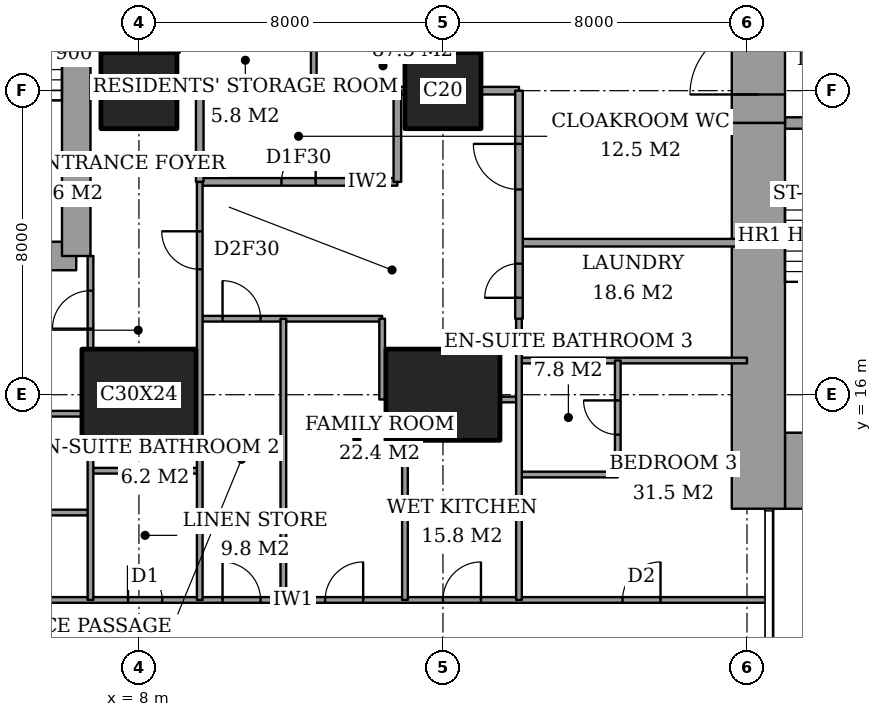
"""IFC4 building model, lengths in metres.
Left out: names, types, materials, properties, quantities, classifications, styles, units other than length and angle.
Written with IfcOpenShell. Run it as: python <this file> out.ifc"""

import sys

from ifc_helpers import new_model, si_unit, direction, frame, frame_2d, origin, origin_2d, place, context, subcontext, project, spatial, rectangle, extrude, element, fill, save


model = new_model("IFC4")
c1 = context("Model", 3, precision=1e-05, world=origin(), true_north=direction((0.0, 1.0)))
c2 = subcontext(c1, "Body", "Model", "MODEL_VIEW")
j1 = project(units=[si_unit("LENGTHUNIT", "METRE"), si_unit("PLANEANGLEUNIT", "RADIAN")], contexts=[c1])
p1 = place(None, origin())
s1 = spatial("IfcSite", under=j1, at=p1, CompositionType="ELEMENT")
p2 = place(p1, origin())
s2 = spatial("IfcBuilding", under=s1, at=p2, CompositionType="ELEMENT")
p3 = place(p2, frame((0.0, 0.0, 65.6)))
s3 = spatial("IfcBuildingStorey", under=s2, at=p3, CompositionType="ELEMENT", Elevation=65.6)
p4 = place(p3, frame((8.0, 16.0, 0.0), z_axis=(0.0, 0.0, 1.0), x_axis=(1.0, 0.0, 0.0)))
e1 = element("IfcColumn", 1, at=p4, inside=s3, PredefinedType="COLUMN", context=c2, shape_type="SweptSolid", body=[
    extrude(rectangle(XDim=3.0, YDim=2.4, at=origin_2d()), origin(), (0.0, 0.0, 1.0), 3.6),
])
p5 = place(p3, frame((8.0, 24.0, 0.0), z_axis=(0.0, 0.0, 1.0), x_axis=(1.0, 0.0, 0.0)))
e2 = element("IfcColumn", 2, at=p5, inside=s3, PredefinedType="COLUMN", context=c2, shape_type="SweptSolid", body=[
    extrude(rectangle(XDim=2.0, YDim=2.0, at=origin_2d()), origin(), (0.0, 0.0, 1.0), 3.6),
])
p6 = place(p3, frame((16.0, 16.0, 0.0), z_axis=(0.0, 0.0, 1.0), x_axis=(1.0, 0.0, 0.0)))
e3 = element("IfcColumn", 3, at=p6, inside=s3, PredefinedType="COLUMN", context=c2, shape_type="SweptSolid", body=[
    extrude(rectangle(XDim=3.0, YDim=2.4, at=origin_2d()), origin(), (0.0, 0.0, 1.0), 3.6),
])
p7 = place(p3, frame((16.0, 24.0, 0.0), z_axis=(0.0, 0.0, 1.0), x_axis=(1.0, 0.0, 0.0)))
e4 = element("IfcColumn", 4, at=p7, inside=s3, PredefinedType="COLUMN", context=c2, shape_type="SweptSolid", body=[
    extrude(rectangle(XDim=2.0, YDim=2.0, at=origin_2d()), origin(), (0.0, 0.0, 1.0), 3.6),
])
p8 = place(p3, frame((25.0, 14.0, 0.0), z_axis=(0.0, 0.0, 1.0), x_axis=(1.0, 0.0, 0.0)))
e5 = element("IfcWall", 5, at=p8, inside=s3, PredefinedType="SHEAR", context=c2, shape_type="SweptSolid", body=[
    extrude(rectangle(XDim=3.15, YDim=2.0, at=frame_2d((1.575, 0.0))), origin(), (0.0, 0.0, 1.0), 3.6),
])
p9 = place(p3, frame((24.3, 13.0, 0.0), z_axis=(0.0, 0.0, 1.0), x_axis=(0.0, 1.0, 0.0)))
e6 = element("IfcWall", 6, at=p9, inside=s3, PredefinedType="SHEAR", context=c2, shape_type="SweptSolid", body=[
    extrude(rectangle(XDim=10.15, YDim=1.4, at=frame_2d((5.075, 0.0))), origin(), (0.0, 0.0, 1.0), 3.6),
])
p10 = place(p3, frame((24.3, 23.15, 0.0), z_axis=(0.0, 0.0, 1.0), x_axis=(0.0, 1.0, 0.0)))
e7 = element("IfcWall", 7, at=p10, inside=s3, PredefinedType="SHEAR", context=c2, shape_type="SweptSolid", body=[
    extrude(rectangle(XDim=11.85, YDim=1.4, at=frame_2d((5.925, 0.0))), origin(), (0.0, 0.0, 1.0), 3.6),
])
p11 = place(p10, frame((0.75, 0.0, 0.0)))
e8 = element("IfcOpeningElement", 8, at=p11, cuts=e7, PredefinedType="OPENING", context=c2, shape_type="SweptSolid", body=[
    extrude(rectangle(XDim=1.8, YDim=2.4, at=frame_2d((0.9, 1.2))), frame((0.0, 0.71, 0.0), z_axis=(0.0, -1.0, 0.0), x_axis=(1.0, 0.0, 0.0)), (0.0, 0.0, 1.0), 1.42),
])
p12 = place(p3, frame((25.0, 23.15, 0.0), z_axis=(0.0, 0.0, 1.0), x_axis=(1.0, 0.0, 0.0)))
e9 = element("IfcWall", 9, at=p12, inside=s3, PredefinedType="SHEAR", context=c2, shape_type="SweptSolid", body=[
    extrude(rectangle(XDim=3.15, YDim=0.3, at=frame_2d((1.575, 0.0))), origin(), (0.0, 0.0, 1.0), 3.6),
])
p13 = place(p12, frame((0.6, 0.0, 0.0)))
e10 = element("IfcOpeningElement", 10, at=p13, cuts=e9, PredefinedType="OPENING", context=c2, shape_type="SweptSolid", body=[
    extrude(rectangle(XDim=1.0, YDim=2.1, at=frame_2d((0.5, 1.05))), frame((0.0, 0.16, 0.0), z_axis=(0.0, -1.0, 0.0), x_axis=(1.0, 0.0, 0.0)), (0.0, 0.0, 1.0), 0.32),
])
p14 = place(p3, frame((1.9, 19.65, 0.0), z_axis=(0.0, 0.0, 1.0), x_axis=(1.0, 0.0, 0.0)))
e11 = element("IfcWall", 11, at=p14, inside=s3, PredefinedType="SHEAR", context=c2, shape_type="SweptSolid", body=[
    extrude(rectangle(XDim=4.45, YDim=0.75, at=frame_2d((2.225, 0.0))), origin(), (0.0, 0.0, 1.0), 3.6),
])
p15 = place(p3, frame((6.35, 19.65, 0.0), z_axis=(0.0, 0.0, 1.0), x_axis=(0.0, 1.0, 0.0)))
e12 = element("IfcWall", 12, at=p15, inside=s3, PredefinedType="SHEAR", context=c2, shape_type="SweptSolid", body=[
    extrude(rectangle(XDim=8.7, YDim=0.75, at=frame_2d((4.35, 0.0))), origin(), (0.0, 0.0, 1.0), 3.6),
])
p16 = place(p15, frame((6.725, 0.0, 0.0)))
e13 = element("IfcOpeningElement", 13, at=p16, cuts=e12, PredefinedType="OPENING", context=c2, shape_type="SweptSolid", body=[
    extrude(rectangle(XDim=1.0, YDim=2.1, at=frame_2d((0.5, 1.05))), frame((0.0, 0.385, 0.0), z_axis=(0.0, -1.0, 0.0), x_axis=(1.0, 0.0, 0.0)), (0.0, 0.0, 1.0), 0.77),
])
p17 = place(p3, frame((-0.45, 10.6, 0.0), z_axis=(0.0, 0.0, 1.0), x_axis=(1.0, 0.0, 0.0)))
e14 = element("IfcWall", 14, at=p17, inside=s3, PredefinedType="PARTITIONING", context=c2, shape_type="SweptSolid", body=[
    extrude(rectangle(XDim=25.011, YDim=0.15, at=frame_2d((12.505, 0.0))), origin(), (0.0, 0.0, 1.0), 3.35),
])
p18 = place(p17, frame((10.65, 0.0, 0.0)))
e15 = element("IfcOpeningElement", 15, at=p18, cuts=e14, PredefinedType="OPENING", context=c2, shape_type="SweptSolid", body=[
    extrude(rectangle(XDim=1.0, YDim=2.1, at=frame_2d((0.5, 1.05))), frame((0.0, 0.085, 0.0), z_axis=(0.0, -1.0, 0.0), x_axis=(1.0, 0.0, 0.0)), (0.0, 0.0, 1.0), 0.17),
])
p19 = place(p17, frame((3.087, 0.0, 0.0)))
e16 = element("IfcOpeningElement", 16, at=p19, cuts=e14, PredefinedType="OPENING", context=c2, shape_type="SweptSolid", body=[
    extrude(rectangle(XDim=1.0, YDim=2.1, at=frame_2d((0.5, 1.05))), frame((0.0, 0.085, 0.0), z_axis=(0.0, -1.0, 0.0), x_axis=(1.0, 0.0, 0.0)), (0.0, 0.0, 1.0), 0.17),
])
p20 = place(p17, frame((8.163, 0.0, 0.0)))
e17 = element("IfcOpeningElement", 17, at=p20, cuts=e14, PredefinedType="OPENING", context=c2, shape_type="SweptSolid", body=[
    extrude(rectangle(XDim=0.9, YDim=2.1, at=frame_2d((0.45, 1.05))), frame((0.0, 0.085, 0.0), z_axis=(0.0, -1.0, 0.0), x_axis=(1.0, 0.0, 0.0)), (0.0, 0.0, 1.0), 0.17),
])
p21 = place(p17, frame((13.35, 0.0, 0.0)))
e18 = element("IfcOpeningElement", 18, at=p21, cuts=e14, PredefinedType="OPENING", context=c2, shape_type="SweptSolid", body=[
    extrude(rectangle(XDim=1.0, YDim=2.1, at=frame_2d((0.5, 1.05))), frame((0.0, 0.085, 0.0), z_axis=(0.0, -1.0, 0.0), x_axis=(1.0, 0.0, 0.0)), (0.0, 0.0, 1.0), 0.17),
])
p22 = place(p17, frame((16.45, 0.0, 0.0)))
e19 = element("IfcOpeningElement", 19, at=p22, cuts=e14, PredefinedType="OPENING", context=c2, shape_type="SweptSolid", body=[
    extrude(rectangle(XDim=1.0, YDim=2.1, at=frame_2d((0.5, 1.05))), frame((0.0, 0.085, 0.0), z_axis=(0.0, -1.0, 0.0), x_axis=(1.0, 0.0, 0.0)), (0.0, 0.0, 1.0), 0.17),
])
p23 = place(p17, frame((21.175, 0.0, 0.0)))
e20 = element("IfcOpeningElement", 20, at=p23, cuts=e14, PredefinedType="OPENING", context=c2, shape_type="SweptSolid", body=[
    extrude(rectangle(XDim=1.0, YDim=2.1, at=frame_2d((0.5, 1.05))), frame((0.0, 0.085, 0.0), z_axis=(0.0, -1.0, 0.0), x_axis=(1.0, 0.0, 0.0)), (0.0, 0.0, 1.0), 0.17),
])
p24 = place(p3, frame((4.325, 12.9, 0.0), z_axis=(0.0, 0.0, 1.0), x_axis=(1.0, 0.0, 0.0)))
e21 = element("IfcWall", 21, at=p24, inside=s3, PredefinedType="PARTITIONING", context=c2, shape_type="SweptSolid", body=[
    extrude(rectangle(XDim=2.4, YDim=0.15, at=frame_2d((1.2, 0.0))), origin(), (0.0, 0.0, 1.0), 3.35),
])
p25 = place(p3, frame((18.0, 13.9, 0.0), z_axis=(0.0, 0.0, 1.0), x_axis=(1.0, 0.0, 0.0)))
e22 = element("IfcWall", 22, at=p25, inside=s3, PredefinedType="PARTITIONING", context=c2, shape_type="SweptSolid", body=[
    extrude(rectangle(XDim=2.6, YDim=0.15, at=frame_2d((1.3, 0.0))), origin(), (0.0, 0.0, 1.0), 3.35),
])
p26 = place(p3, frame((6.725, 14.0, 0.0), z_axis=(0.0, 0.0, 1.0), x_axis=(1.0, 0.0, 0.0)))
e23 = element("IfcWall", 23, at=p26, inside=s3, PredefinedType="PARTITIONING", context=c2, shape_type="SweptSolid", body=[
    extrude(rectangle(XDim=2.875, YDim=0.15, at=frame_2d((1.438, 0.0))), origin(), (0.0, 0.0, 1.0), 3.35),
])
p27 = place(p3, frame((1.35, 15.5, 0.0), z_axis=(0.0, 0.0, 1.0), x_axis=(1.0, 0.0, 0.0)))
e24 = element("IfcWall", 24, at=p27, inside=s3, PredefinedType="PARTITIONING", context=c2, shape_type="SweptSolid", body=[
    extrude(rectangle(XDim=5.15, YDim=0.15, at=frame_2d((2.575, 0.0))), origin(), (0.0, 0.0, 1.0), 3.35),
])
p28 = place(p3, frame((17.5, 15.875, 0.0), z_axis=(0.0, 0.0, 1.0), x_axis=(1.0, 0.0, 0.0)))
e25 = element("IfcWall", 25, at=p28, inside=s3, PredefinedType="PARTITIONING", context=c2, shape_type="SweptSolid", body=[
    extrude(rectangle(XDim=0.5, YDim=0.15, at=frame_2d((0.25, 0.0))), origin(), (0.0, 0.0, 1.0), 2.634),
])
p29 = place(p3, frame((18.0, 16.9, 0.0), z_axis=(0.0, 0.0, 1.0), x_axis=(1.0, 0.0, 0.0)))
e26 = element("IfcWall", 26, at=p29, inside=s3, PredefinedType="PARTITIONING", context=c2, shape_type="SweptSolid", body=[
    extrude(rectangle(XDim=6.0, YDim=0.15, at=frame_2d((3.0, 0.0))), origin(), (0.0, 0.0, 1.0), 3.35),
])
p30 = place(p3, frame((9.6, 18.0, 0.0), z_axis=(0.0, 0.0, 1.0), x_axis=(1.0, 0.0, 0.0)))
e27 = element("IfcWall", 27, at=p30, inside=s3, PredefinedType="PARTITIONING", context=c2, shape_type="SweptSolid", body=[
    extrude(rectangle(XDim=4.8, YDim=0.15, at=frame_2d((2.4, 0.0))), origin(), (0.0, 0.0, 1.0), 3.35),
])
p31 = place(p30, frame((0.6, 0.0, 0.0)))
e28 = element("IfcOpeningElement", 28, at=p31, cuts=e27, PredefinedType="OPENING", context=c2, shape_type="SweptSolid", body=[
    extrude(rectangle(XDim=1.0, YDim=2.1, at=frame_2d((0.5, 1.05))), frame((0.0, 0.085, 0.0), z_axis=(0.0, -1.0, 0.0), x_axis=(1.0, 0.0, 0.0)), (0.0, 0.0, 1.0), 0.17),
])
p32 = place(p3, frame((18.0, 20.0, 0.0), z_axis=(0.0, 0.0, 1.0), x_axis=(1.0, 0.0, 0.0)))
e29 = element("IfcWall", 29, at=p32, inside=s3, PredefinedType="PARTITIONING", context=c2, shape_type="SweptSolid", body=[
    extrude(rectangle(XDim=6.0, YDim=0.2, at=frame_2d((3.0, 0.0))), origin(), (0.0, 0.0, 1.0), 3.35),
])
p33 = place(p3, frame((9.6, 21.6, 0.0), z_axis=(0.0, 0.0, 1.0), x_axis=(1.0, 0.0, 0.0)))
e30 = element("IfcWall", 30, at=p33, inside=s3, PredefinedType="PARTITIONING", context=c2, shape_type="SweptSolid", body=[
    extrude(rectangle(XDim=5.2, YDim=0.2, at=frame_2d((2.6, 0.0))), origin(), (0.0, 0.0, 1.0), 3.35),
])
p34 = place(p33, frame((2.15, 0.0, 0.0)))
e31 = element("IfcOpeningElement", 31, at=p34, cuts=e30, PredefinedType="OPENING", context=c2, shape_type="SweptSolid", body=[
    extrude(rectangle(XDim=0.9, YDim=2.1, at=frame_2d((0.45, 1.05))), frame((0.0, 0.11, 0.0), z_axis=(0.0, -1.0, 0.0), x_axis=(1.0, 0.0, 0.0)), (0.0, 0.0, 1.0), 0.22),
])
p35 = place(p3, frame((9.0, 24.0, 0.0), z_axis=(0.0, 0.0, 1.0), x_axis=(1.0, 0.0, 0.0)))
e32 = element("IfcWall", 32, at=p35, inside=s3, PredefinedType="PARTITIONING", context=c2, shape_type="SweptSolid", body=[
    extrude(rectangle(XDim=6.0, YDim=0.2, at=frame_2d((3.0, 0.0))), origin(), (0.0, 0.0, 1.0), 3.35),
])
p36 = place(p3, frame((17.0, 24.0, 0.0), z_axis=(0.0, 0.0, 1.0), x_axis=(1.0, 0.0, 0.0)))
e33 = element("IfcWall", 33, at=p36, inside=s3, PredefinedType="PARTITIONING", context=c2, shape_type="SweptSolid", body=[
    extrude(rectangle(XDim=1.0, YDim=0.2, at=frame_2d((0.5, 0.0))), origin(), (0.0, 0.0, 1.0), 3.35),
])
p37 = place(p3, frame((6.725, 10.6, 0.0), z_axis=(0.0, 0.0, 1.0), x_axis=(0.0, 1.0, 0.0)))
e34 = element("IfcWall", 34, at=p37, inside=s3, PredefinedType="PARTITIONING", context=c2, shape_type="SweptSolid", body=[
    extrude(rectangle(XDim=4.2, YDim=0.15, at=frame_2d((2.1, 0.0))), origin(), (0.0, 0.0, 1.0), 3.35),
])
p38 = place(p3, frame((6.725, 17.2, 0.0), z_axis=(0.0, 0.0, 1.0), x_axis=(0.0, 1.0, 0.0)))
e35 = element("IfcWall", 35, at=p38, inside=s3, PredefinedType="PARTITIONING", context=c2, shape_type="SweptSolid", body=[
    extrude(rectangle(XDim=2.45, YDim=0.15, at=frame_2d((1.225, 0.0))), origin(), (0.0, 0.0, 1.0), 3.35),
])
p39 = place(p38, frame((0.538, 0.0, 0.0)))
e36 = element("IfcOpeningElement", 36, at=p39, cuts=e35, PredefinedType="OPENING", context=c2, shape_type="SweptSolid", body=[
    extrude(rectangle(XDim=1.0, YDim=2.1, at=frame_2d((0.5, 1.05))), frame((0.0, 0.085, 0.0), z_axis=(0.0, -1.0, 0.0), x_axis=(1.0, 0.0, 0.0)), (0.0, 0.0, 1.0), 0.17),
])
p40 = place(p3, frame((9.6, 21.6, 0.0), z_axis=(0.0, 0.0, 1.0), x_axis=(0.0, 1.0, 0.0)))
e37 = element("IfcWall", 37, at=p40, inside=s3, PredefinedType="PARTITIONING", context=c2, shape_type="SweptSolid", body=[
    extrude(rectangle(XDim=2.4, YDim=0.2, at=frame_2d((1.2, 0.0))), origin(), (0.0, 0.0, 1.0), 3.35),
])
p41 = place(p3, frame((9.6, 10.6, 0.0), z_axis=(0.0, 0.0, 1.0), x_axis=(0.0, 1.0, 0.0)))
e38 = element("IfcWall", 38, at=p41, inside=s3, PredefinedType="PARTITIONING", context=c2, shape_type="SweptSolid", body=[
    extrude(rectangle(XDim=11.0, YDim=0.15, at=frame_2d((5.5, 0.0))), origin(), (0.0, 0.0, 1.0), 3.35),
])
p42 = place(p41, frame((8.7, 0.0, 0.0)))
e39 = element("IfcOpeningElement", 39, at=p42, cuts=e38, PredefinedType="OPENING", context=c2, shape_type="SweptSolid", body=[
    extrude(rectangle(XDim=1.0, YDim=2.1, at=frame_2d((0.5, 1.05))), frame((0.0, 0.085, 0.0), z_axis=(0.0, -1.0, 0.0), x_axis=(1.0, 0.0, 0.0)), (0.0, 0.0, 1.0), 0.17),
])
p43 = place(p3, frame((11.8, 10.6, 0.0), z_axis=(0.0, 0.0, 1.0), x_axis=(0.0, 1.0, 0.0)))
e40 = element("IfcWall", 40, at=p43, inside=s3, PredefinedType="PARTITIONING", context=c2, shape_type="SweptSolid", body=[
    extrude(rectangle(XDim=7.4, YDim=0.15, at=frame_2d((3.7, 0.0))), origin(), (0.0, 0.0, 1.0), 3.35),
])
p44 = place(p3, frame((12.6, 24.0, 0.0), z_axis=(0.0, 0.0, 1.0), x_axis=(0.0, 1.0, 0.0)))
e41 = element("IfcWall", 41, at=p44, inside=s3, PredefinedType="PARTITIONING", context=c2, shape_type="SweptSolid", body=[
    extrude(rectangle(XDim=1.6, YDim=0.15, at=frame_2d((0.8, 0.0))), origin(), (0.0, 0.0, 1.0), 3.35),
])
p45 = place(p3, frame((14.4, 15.875, 0.0), z_axis=(0.0, 0.0, 1.0), x_axis=(0.0, 1.0, 0.0)))
e42 = element("IfcWall", 42, at=p45, inside=s3, PredefinedType="PARTITIONING", context=c2, shape_type="SweptSolid", body=[
    extrude(rectangle(XDim=2.125, YDim=0.15, at=frame_2d((1.062, 0.0))), origin(), (0.0, 0.0, 1.0), 3.35),
])
p46 = place(p3, frame((14.8, 21.6, 0.0), z_axis=(0.0, 0.0, 1.0), x_axis=(0.0, 1.0, 0.0)))
e43 = element("IfcWall", 43, at=p46, inside=s3, PredefinedType="PARTITIONING", context=c2, shape_type="SweptSolid", body=[
    extrude(rectangle(XDim=2.4, YDim=0.2, at=frame_2d((1.2, 0.0))), origin(), (0.0, 0.0, 1.0), 3.35),
])
p47 = place(p3, frame((15.0, 10.6, 0.0), z_axis=(0.0, 0.0, 1.0), x_axis=(0.0, 1.0, 0.0)))
e44 = element("IfcWall", 44, at=p47, inside=s3, PredefinedType="PARTITIONING", context=c2, shape_type="SweptSolid", body=[
    extrude(rectangle(XDim=4.2, YDim=0.15, at=frame_2d((2.1, 0.0))), origin(), (0.0, 0.0, 1.0), 3.35),
])
p48 = place(p3, frame((18.0, 18.0, 0.0), z_axis=(0.0, 0.0, 1.0), x_axis=(0.0, 1.0, 0.0)))
e45 = element("IfcWall", 45, at=p48, inside=s3, PredefinedType="PARTITIONING", context=c2, shape_type="SweptSolid", body=[
    extrude(rectangle(XDim=6.0, YDim=0.2, at=frame_2d((3.0, 0.0))), origin(), (0.0, 0.0, 1.0), 3.35),
])
p49 = place(p48, frame((3.4, 0.0, 0.0)))
e46 = element("IfcOpeningElement", 46, at=p49, cuts=e45, PredefinedType="OPENING", context=c2, shape_type="SweptSolid", body=[
    extrude(rectangle(XDim=1.2, YDim=2.4, at=frame_2d((0.6, 1.2))), frame((0.0, 0.11, 0.0), z_axis=(0.0, -1.0, 0.0), x_axis=(1.0, 0.0, 0.0)), (0.0, 0.0, 1.0), 0.22),
])
p50 = place(p48, frame((0.55, 0.0, 0.0)))
e47 = element("IfcOpeningElement", 47, at=p50, cuts=e45, PredefinedType="OPENING", context=c2, shape_type="SweptSolid", body=[
    extrude(rectangle(XDim=0.9, YDim=2.1, at=frame_2d((0.45, 1.05))), frame((0.0, 0.11, 0.0), z_axis=(0.0, -1.0, 0.0), x_axis=(1.0, 0.0, 0.0)), (0.0, 0.0, 1.0), 0.22),
])
p51 = place(p3, frame((18.0, 10.6, 0.0), z_axis=(0.0, 0.0, 1.0), x_axis=(0.0, 1.0, 0.0)))
e48 = element("IfcWall", 48, at=p51, inside=s3, PredefinedType="PARTITIONING", context=c2, shape_type="SweptSolid", body=[
    extrude(rectangle(XDim=7.4, YDim=0.15, at=frame_2d((3.7, 0.0))), origin(), (0.0, 0.0, 1.0), 3.35),
])
p52 = place(p3, frame((20.6, 13.9, 0.0), z_axis=(0.0, 0.0, 1.0), x_axis=(0.0, 1.0, 0.0)))
e49 = element("IfcWall", 49, at=p52, inside=s3, PredefinedType="PARTITIONING", context=c2, shape_type="SweptSolid", body=[
    extrude(rectangle(XDim=3.0, YDim=0.15, at=frame_2d((1.5, 0.0))), origin(), (0.0, 0.0, 1.0), 3.35),
])
p53 = place(p52, frame((1.05, 0.0, 0.0)))
e50 = element("IfcOpeningElement", 50, at=p53, cuts=e49, PredefinedType="OPENING", context=c2, shape_type="SweptSolid", body=[
    extrude(rectangle(XDim=0.9, YDim=2.1, at=frame_2d((0.45, 1.05))), frame((0.0, 0.085, 0.0), z_axis=(0.0, -1.0, 0.0), x_axis=(1.0, 0.0, 0.0)), (0.0, 0.0, 1.0), 0.17),
])
p54 = place(p18, origin())
e51 = element("IfcDoor", 51, at=p54, inside=s3, OperationType="SINGLE_SWING_RIGHT", PredefinedType="DOOR", context=c2, shape_type="SweptSolid", body=[
    extrude(rectangle(XDim=1.0, YDim=2.1, at=frame_2d((0.5, 1.05))), frame((0.0, 0.025, 0.0), z_axis=(0.0, -1.0, 0.0), x_axis=(1.0, 0.0, 0.0)), (0.0, 0.0, 1.0), 0.05),
])
fill(e15, e51)
p55 = place(p39, origin())
e52 = element("IfcDoor", 52, at=p55, inside=s3, OperationType="SINGLE_SWING_RIGHT", PredefinedType="DOOR", context=c2, shape_type="SweptSolid", body=[
    extrude(rectangle(XDim=1.0, YDim=2.1, at=frame_2d((0.5, 1.05))), frame((0.0, 0.025, 0.0), z_axis=(0.0, -1.0, 0.0), x_axis=(1.0, 0.0, 0.0)), (0.0, 0.0, 1.0), 0.05),
])
fill(e36, e52)
p56 = place(p20, origin())
e53 = element("IfcDoor", 53, at=p56, inside=s3, OperationType="SINGLE_SWING_RIGHT", PredefinedType="DOOR", context=c2, shape_type="SweptSolid", body=[
    extrude(rectangle(XDim=0.9, YDim=2.1, at=frame_2d((0.45, 1.05))), frame((0.0, 0.025, 0.0), z_axis=(0.0, -1.0, 0.0), x_axis=(1.0, 0.0, 0.0)), (0.0, 0.0, 1.0), 0.05),
])
fill(e17, e53)
p57 = place(p42, origin())
e54 = element("IfcDoor", 54, at=p57, inside=s3, OperationType="SINGLE_SWING_LEFT", PredefinedType="DOOR", context=c2, shape_type="SweptSolid", body=[
    extrude(rectangle(XDim=1.0, YDim=2.1, at=frame_2d((0.5, 1.05))), frame((0.0, 0.025, 0.0), z_axis=(0.0, -1.0, 0.0), x_axis=(1.0, 0.0, 0.0)), (0.0, 0.0, 1.0), 0.05),
])
fill(e39, e54)
p58 = place(p34, origin())
e55 = element("IfcDoor", 55, at=p58, inside=s3, OperationType="SINGLE_SWING_LEFT", PredefinedType="DOOR", context=c2, shape_type="SweptSolid", body=[
    extrude(rectangle(XDim=0.9, YDim=2.1, at=frame_2d((0.45, 1.05))), frame((0.0, 0.025, 0.0), z_axis=(0.0, -1.0, 0.0), x_axis=(1.0, 0.0, 0.0)), (0.0, 0.0, 1.0), 0.05),
])
fill(e31, e55)
p59 = place(p49, origin())
e56 = element("IfcDoor", 56, at=p59, inside=s3, OperationType="SINGLE_SWING_LEFT", PredefinedType="DOOR", context=c2, shape_type="SweptSolid", body=[
    extrude(rectangle(XDim=1.2, YDim=2.4, at=frame_2d((0.6, 1.2))), frame((0.0, 0.025, 0.0), z_axis=(0.0, -1.0, 0.0), x_axis=(1.0, 0.0, 0.0)), (0.0, 0.0, 1.0), 0.05),
])
fill(e46, e56)
p60 = place(p31, origin())
e57 = element("IfcDoor", 57, at=p60, inside=s3, OperationType="SINGLE_SWING_RIGHT", PredefinedType="DOOR", context=c2, shape_type="SweptSolid", body=[
    extrude(rectangle(XDim=1.0, YDim=2.1, at=frame_2d((0.5, 1.05))), frame((0.0, 0.025, 0.0), z_axis=(0.0, -1.0, 0.0), x_axis=(1.0, 0.0, 0.0)), (0.0, 0.0, 1.0), 0.05),
])
fill(e28, e57)
p61 = place(p21, origin())
e58 = element("IfcDoor", 58, at=p61, inside=s3, OperationType="SINGLE_SWING_LEFT", PredefinedType="DOOR", context=c2, shape_type="SweptSolid", body=[
    extrude(rectangle(XDim=1.0, YDim=2.1, at=frame_2d((0.5, 1.05))), frame((0.0, 0.025, 0.0), z_axis=(0.0, -1.0, 0.0), x_axis=(1.0, 0.0, 0.0)), (0.0, 0.0, 1.0), 0.05),
])
fill(e18, e58)
p62 = place(p22, origin())
e59 = element("IfcDoor", 59, at=p62, inside=s3, OperationType="SINGLE_SWING_LEFT", PredefinedType="DOOR", context=c2, shape_type="SweptSolid", body=[
    extrude(rectangle(XDim=1.0, YDim=2.1, at=frame_2d((0.5, 1.05))), frame((0.0, 0.025, 0.0), z_axis=(0.0, -1.0, 0.0), x_axis=(1.0, 0.0, 0.0)), (0.0, 0.0, 1.0), 0.05),
])
fill(e19, e59)
p63 = place(p53, origin())
e60 = element("IfcDoor", 60, at=p63, inside=s3, OperationType="SINGLE_SWING_LEFT", PredefinedType="DOOR", context=c2, shape_type="SweptSolid", body=[
    extrude(rectangle(XDim=0.9, YDim=2.1, at=frame_2d((0.45, 1.05))), frame((0.0, 0.025, 0.0), z_axis=(0.0, -1.0, 0.0), x_axis=(1.0, 0.0, 0.0)), (0.0, 0.0, 1.0), 0.05),
])
fill(e50, e60)
p64 = place(p23, origin())
e61 = element("IfcDoor", 61, at=p64, inside=s3, OperationType="SINGLE_SWING_LEFT", PredefinedType="DOOR", context=c2, shape_type="SweptSolid", body=[
    extrude(rectangle(XDim=1.0, YDim=2.1, at=frame_2d((0.5, 1.05))), frame((0.0, 0.025, 0.0), z_axis=(0.0, -1.0, 0.0), x_axis=(1.0, 0.0, 0.0)), (0.0, 0.0, 1.0), 0.05),
])
fill(e20, e61)
p65 = place(p50, origin())
e62 = element("IfcDoor", 62, at=p65, inside=s3, OperationType="SINGLE_SWING_RIGHT", PredefinedType="DOOR", context=c2, shape_type="SweptSolid", body=[
    extrude(rectangle(XDim=0.9, YDim=2.1, at=frame_2d((0.45, 1.05))), frame((0.0, 0.025, 0.0), z_axis=(0.0, -1.0, 0.0), x_axis=(1.0, 0.0, 0.0)), (0.0, 0.0, 1.0), 0.05),
])
fill(e47, e62)
p66 = place(p11, origin())
e63 = element("IfcDoor", 63, at=p66, inside=s3, OperationType="DOUBLE_DOOR_DOUBLE_SWING", PredefinedType="DOOR", context=c2, shape_type="SweptSolid", body=[
    extrude(rectangle(XDim=1.8, YDim=2.4, at=frame_2d((0.9, 1.2))), frame((0.0, 0.025, 0.0), z_axis=(0.0, -1.0, 0.0), x_axis=(1.0, 0.0, 0.0)), (0.0, 0.0, 1.0), 0.05),
])
fill(e8, e63)
save(model, sys.argv[1])
